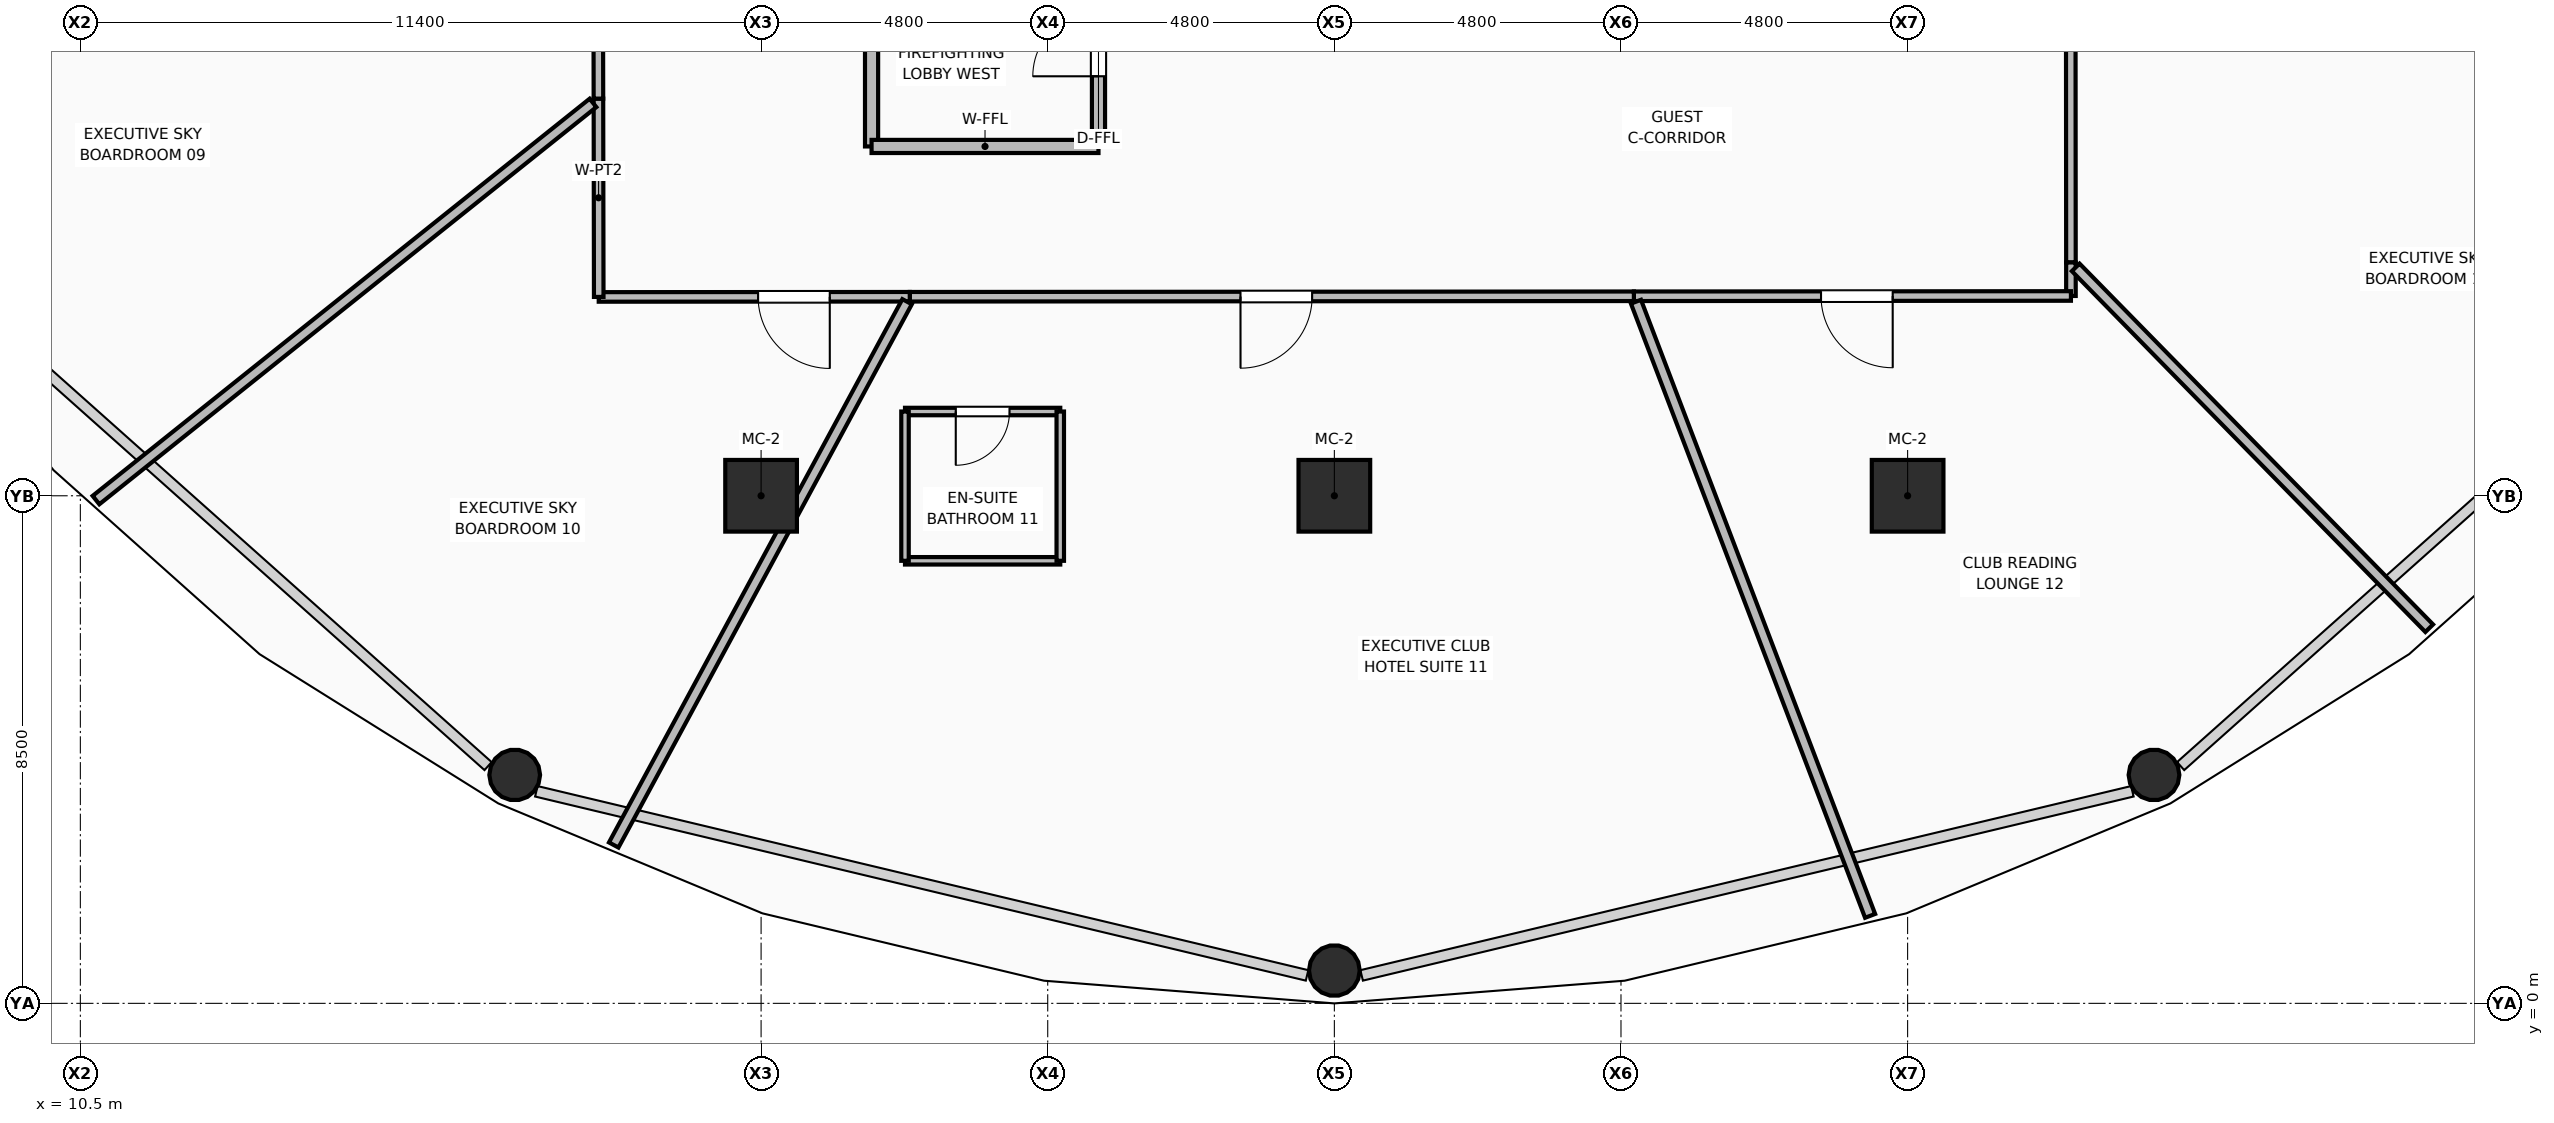
"""IFC4 building model, lengths in metres.
Left out: names, types, materials, properties, quantities, classifications, styles, units other than length and angle.
Written with IfcOpenShell. Run it as: python <this file> out.ifc"""

import sys

from ifc_helpers import new_model, si_unit, direction, frame, frame_2d, origin, origin_2d, place, context, subcontext, project, spatial, rectangle, hollow_rectangle, hollow_circle, extrude, element, fill, save


model = new_model("IFC4")
c1 = context("Model", 3, precision=1e-05, world=origin(), true_north=direction((0.0, 1.0)))
c2 = subcontext(c1, "Body", "Model", "MODEL_VIEW")
j1 = project(units=[si_unit("LENGTHUNIT", "METRE"), si_unit("PLANEANGLEUNIT", "RADIAN")], contexts=[c1])
p1 = place(None, origin())
s1 = spatial("IfcSite", under=j1, at=p1, CompositionType="ELEMENT")
p2 = place(p1, origin())
s2 = spatial("IfcBuilding", under=s1, at=p2, CompositionType="ELEMENT")
p3 = place(p2, frame((0.0, 0.0, 60.75)))
s3 = spatial("IfcBuildingStorey", under=s2, at=p3, CompositionType="ELEMENT", Elevation=60.75)
for number, where, z_axis, x_axis in (
    (1, (21.9, 8.5, 0.0), (0.0, 0.0, 1.0), (1.0, 0.0, 0.0)),
    (2, (31.5, 8.5, 0.0), (0.0, 0.0, 1.0), (1.0, 0.0, 0.0)),
    (3, (41.1, 8.5, 0.0), (0.0, 0.0, 1.0), (1.0, 0.0, 0.0)),
):
    element("IfcColumn", number, at=place(p3, frame(where, z_axis=z_axis, x_axis=x_axis)), inside=s3, PredefinedType="COLUMN", context=c2, shape_type="SweptSolid", body=[
        extrude(hollow_rectangle(XDim=1.2, YDim=1.2, WallThickness=0.045, at=origin_2d()), origin(), (0.0, 0.0, 1.0), 3.75),
    ])
for number, where, z_axis, x_axis in (
    (4, (17.774, 3.825, 0.0), (0.0, 0.0, 1.0), (1.0, 0.0, 0.0)),
    (5, (31.5, 0.549, 0.0), (0.0, 0.0, 1.0), (1.0, 0.0, 0.0)),
    (6, (45.226, 3.825, 0.0), (0.0, 0.0, 1.0), (1.0, 0.0, 0.0)),
):
    element("IfcColumn", number, at=place(p3, frame(where, z_axis=z_axis, x_axis=x_axis)), inside=s3, PredefinedType="COLUMN", context=c2, shape_type="SweptSolid", body=[
        extrude(hollow_circle(Radius=0.425, WallThickness=0.04, at=origin_2d()), origin(), (0.0, 0.0, 1.0), 3.57),
    ])
p4 = place(p3, frame((23.75, 14.35, 0.0), z_axis=(0.0, 0.0, 1.0), x_axis=(0.0, 1.0, 0.0)))
e7 = element("IfcWall", 7, at=p4, inside=s3, PredefinedType="PARTITIONING", context=c2, shape_type="SweptSolid", body=[
    extrude(rectangle(XDim=3.45, YDim=0.22, at=frame_2d((1.725, 0.0))), origin(), (0.0, 0.0, 1.0), 2.928),
])
p5 = place(p3, frame((23.75, 14.35, 0.0), z_axis=(0.0, 0.0, 1.0), x_axis=(1.0, 0.0, 0.0)))
e8 = element("IfcWall", 8, at=p5, inside=s3, PredefinedType="PARTITIONING", context=c2, shape_type="SweptSolid", body=[
    extrude(rectangle(XDim=3.8, YDim=0.22, at=frame_2d((1.9, 0.0))), origin(), (0.0, 0.0, 1.0), 3.55),
])
p6 = place(p3, frame((27.55, 14.35, 0.0), z_axis=(0.0, 0.0, 1.0), x_axis=(0.0, 1.0, 0.0)))
e9 = element("IfcWall", 9, at=p6, inside=s3, PredefinedType="PARTITIONING", context=c2, shape_type="SweptSolid", body=[
    extrude(rectangle(XDim=3.45, YDim=0.22, at=frame_2d((1.725, 0.0))), origin(), (0.0, 0.0, 1.0), 2.928),
])
p7 = place(p6, frame((1.175, 0.0, 0.0)))
e10 = element("IfcOpeningElement", 10, at=p7, cuts=e9, PredefinedType="OPENING", context=c2, shape_type="SweptSolid", body=[
    extrude(rectangle(XDim=1.1, YDim=2.1, at=frame_2d((0.55, 1.05))), frame((0.0, 0.12, 0.0), z_axis=(0.0, -1.0, 0.0), x_axis=(1.0, 0.0, 0.0)), (0.0, 0.0, 1.0), 0.24),
])
p8 = place(p3, frame((43.83, 19.568, 0.0), z_axis=(0.0, 0.0, 1.0), x_axis=(0.000681849016, -0.999999767541, 0.0)))
e11 = element("IfcWall", 11, at=p8, inside=s3, PredefinedType="PARTITIONING", context=c2, shape_type="SweptSolid", body=[
    extrude(rectangle(XDim=7.161, YDim=0.16, at=frame_2d((3.581, 0.0))), origin(), (0.0, 0.0, 1.0), 2.928),
])
p9 = place(p8, frame((0.605, 0.0, 0.0)))
e12 = element("IfcOpeningElement", 12, at=p9, cuts=e11, PredefinedType="OPENING", context=c2, shape_type="SweptSolid", body=[
    extrude(rectangle(XDim=1.2, YDim=2.1, at=frame_2d((0.6, 1.05))), frame((0.0, 0.09, 0.0), z_axis=(0.0, -1.0, 0.0), x_axis=(1.0, 0.0, 0.0)), (0.0, 0.0, 1.0), 0.18),
])
p10 = place(p3, frame((43.835, 12.407, 0.0), z_axis=(0.0, 0.0, 1.0), x_axis=(0.0, -1.0, 0.0)))
e13 = element("IfcWall", 13, at=p10, inside=s3, PredefinedType="PARTITIONING", context=c2, shape_type="SweptSolid", body=[
    extrude(rectangle(XDim=0.561, YDim=0.16, at=frame_2d((0.281, 0.0))), origin(), (0.0, 0.0, 1.0), 3.55),
])
p11 = place(p3, frame((43.835, 11.846, 0.0), z_axis=(0.0, 0.0, 1.0), x_axis=(-0.999999777452, -0.000667155766, 0.0)))
e14 = element("IfcWall", 14, at=p11, inside=s3, PredefinedType="PARTITIONING", context=c2, shape_type="SweptSolid", body=[
    extrude(rectangle(XDim=7.319, YDim=0.16, at=frame_2d((3.659, 0.0))), origin(), (0.0, 0.0, 1.0), 2.928),
])
p12 = place(p11, frame((2.985, 0.0, 0.0)))
e15 = element("IfcOpeningElement", 15, at=p12, cuts=e14, PredefinedType="OPENING", context=c2, shape_type="SweptSolid", body=[
    extrude(rectangle(XDim=1.2, YDim=2.1, at=frame_2d((0.6, 1.05))), frame((0.0, 0.09, 0.0), z_axis=(0.0, -1.0, 0.0), x_axis=(1.0, 0.0, 0.0)), (0.0, 0.0, 1.0), 0.18),
])
p13 = place(p3, frame((36.516, 11.841, 0.0), z_axis=(0.0, 0.0, 1.0), x_axis=(-0.999999779288, -0.00066439817, 0.0)))
e16 = element("IfcWall", 16, at=p13, inside=s3, PredefinedType="PARTITIONING", context=c2, shape_type="SweptSolid", body=[
    extrude(rectangle(XDim=12.126, YDim=0.16, at=frame_2d((6.063, 0.0))), origin(), (0.0, 0.0, 1.0), 2.928),
])
p14 = place(p13, frame((5.388, 0.0, 0.0)))
e17 = element("IfcOpeningElement", 17, at=p14, cuts=e16, PredefinedType="OPENING", context=c2, shape_type="SweptSolid", body=[
    extrude(rectangle(XDim=1.2, YDim=2.1, at=frame_2d((0.6, 1.05))), frame((0.0, 0.09, 0.0), z_axis=(0.0, -1.0, 0.0), x_axis=(1.0, 0.0, 0.0)), (0.0, 0.0, 1.0), 0.18),
])
p15 = place(p3, frame((24.39, 11.833, 0.0), z_axis=(0.0, 0.0, 1.0), x_axis=(-0.999999841836, -0.000562429607, 0.0)))
e18 = element("IfcWall", 18, at=p15, inside=s3, PredefinedType="PARTITIONING", context=c2, shape_type="SweptSolid", body=[
    extrude(rectangle(XDim=5.209, YDim=0.16, at=frame_2d((2.604, 0.0))), origin(), (0.0, 0.0, 1.0), 2.928),
])
p16 = place(p15, frame((1.34, 0.0, 0.0)))
e19 = element("IfcOpeningElement", 19, at=p16, cuts=e18, PredefinedType="OPENING", context=c2, shape_type="SweptSolid", body=[
    extrude(rectangle(XDim=1.2, YDim=2.1, at=frame_2d((0.6, 1.05))), frame((0.0, 0.09, 0.0), z_axis=(0.0, -1.0, 0.0), x_axis=(1.0, 0.0, 0.0)), (0.0, 0.0, 1.0), 0.18),
])
p17 = place(p3, frame((19.181, 11.83, 0.0), z_axis=(0.0, 0.0, 1.0), x_axis=(-0.001470370415, 0.999998919005, 0.0)))
e20 = element("IfcWall", 20, at=p17, inside=s3, PredefinedType="PARTITIONING", context=c2, shape_type="SweptSolid", body=[
    extrude(rectangle(XDim=3.321, YDim=0.16, at=frame_2d((1.66, 0.0))), origin(), (0.0, 0.0, 1.0), 3.55),
])
p18 = place(p3, frame((19.176, 15.151, 0.0), z_axis=(0.0, 0.0, 1.0), x_axis=(-0.001827037145, 0.999998330966, 0.0)))
e21 = element("IfcWall", 21, at=p18, inside=s3, PredefinedType="PARTITIONING", context=c2, shape_type="SweptSolid", body=[
    extrude(rectangle(XDim=6.013, YDim=0.16, at=frame_2d((3.007, 0.0))), origin(), (0.0, 0.0, 1.0), 2.928),
])
p19 = place(p18, frame((4.204, 0.0, 0.0)))
e22 = element("IfcOpeningElement", 22, at=p19, cuts=e21, PredefinedType="OPENING", context=c2, shape_type="SweptSolid", body=[
    extrude(rectangle(XDim=1.2, YDim=2.1, at=frame_2d((0.6, 1.05))), frame((0.0, 0.09, 0.0), z_axis=(0.0, -1.0, 0.0), x_axis=(1.0, 0.0, 0.0)), (0.0, 0.0, 1.0), 0.18),
])
p20 = place(p3, frame((19.085, 15.079, 0.0), z_axis=(0.0, 0.0, 1.0), x_axis=(-0.781201807071, -0.624278572938, 0.0)))
e23 = element("IfcWall", 23, at=p20, inside=s3, PredefinedType="PARTITIONING", context=c2, shape_type="SweptSolid", body=[
    extrude(rectangle(XDim=10.654, YDim=0.18, at=frame_2d((5.327, 0.0))), origin(), (0.0, 0.0, 1.0), 2.775),
])
p21 = place(p3, frame((24.345, 11.75, 0.0), z_axis=(0.0, 0.0, 1.0), x_axis=(-0.475165367646, -0.879896512887, 0.0)))
e24 = element("IfcWall", 24, at=p21, inside=s3, PredefinedType="PARTITIONING", context=c2, shape_type="SweptSolid", body=[
    extrude(rectangle(XDim=10.34, YDim=0.18, at=frame_2d((5.17, 0.0))), origin(), (0.0, 0.0, 1.0), 2.775),
])
p22 = place(p3, frame((36.551, 11.75, 0.0), z_axis=(0.0, 0.0, 1.0), x_axis=(0.356220373455, -0.934401972138, 0.0)))
e25 = element("IfcWall", 25, at=p22, inside=s3, PredefinedType="PARTITIONING", context=c2, shape_type="SweptSolid", body=[
    extrude(rectangle(XDim=11.007, YDim=0.18, at=frame_2d((5.503, 0.0))), origin(), (0.0, 0.0, 1.0), 2.775),
])
p23 = place(p3, frame((43.915, 12.325, 0.0), z_axis=(0.0, 0.0, 1.0), x_axis=(0.699796666029, -0.714342093268, 0.0)))
e26 = element("IfcWall", 26, at=p23, inside=s3, PredefinedType="PARTITIONING", context=c2, shape_type="SweptSolid", body=[
    extrude(rectangle(XDim=8.459, YDim=0.18, at=frame_2d((4.23, 0.0))), origin(), (0.0, 0.0, 1.0), 2.775),
])
p24 = place(p3, frame((43.915, 19.531, 0.0), z_axis=(0.0, 0.0, 1.0), x_axis=(0.915142788341, -0.403129851223, 0.0)))
e27 = element("IfcWall", 27, at=p24, inside=s3, PredefinedType="PARTITIONING", context=c2, shape_type="SweptSolid", body=[
    extrude(rectangle(XDim=13.675, YDim=0.18, at=frame_2d((6.838, 0.0))), origin(), (0.0, 0.0, 1.0), 2.775),
])
p25 = place(p3, frame((24.31, 7.411, 0.0), z_axis=(0.0, 0.0, 1.0), x_axis=(1.0, 0.0, 0.0)))
e28 = element("IfcWall", 28, at=p25, inside=s3, PredefinedType="PARTITIONING", context=c2, shape_type="SweptSolid", body=[
    extrude(rectangle(XDim=2.6, YDim=0.125, at=frame_2d((1.3, 0.0))), origin(), (0.0, 0.0, 1.0), 3.55),
])
p26 = place(p3, frame((24.31, 9.911, 0.0), z_axis=(0.0, 0.0, 1.0), x_axis=(1.0, 0.0, 0.0)))
e29 = element("IfcWall", 29, at=p26, inside=s3, PredefinedType="PARTITIONING", context=c2, shape_type="SweptSolid", body=[
    extrude(rectangle(XDim=2.6, YDim=0.125, at=frame_2d((1.3, 0.0))), origin(), (0.0, 0.0, 1.0), 3.55),
])
p27 = place(p26, frame((0.85, 0.0, 0.0)))
e30 = element("IfcOpeningElement", 30, at=p27, cuts=e29, PredefinedType="OPENING", context=c2, shape_type="SweptSolid", body=[
    extrude(rectangle(XDim=0.9, YDim=2.1, at=frame_2d((0.45, 1.05))), frame((0.0, 0.073, 0.0), z_axis=(0.0, -1.0, 0.0), x_axis=(1.0, 0.0, 0.0)), (0.0, 0.0, 1.0), 0.145),
])
for number, where, z_axis, x_axis in (
    (31, (24.31, 7.411, 0.0), (0.0, 0.0, 1.0), (0.0, 1.0, 0.0)),
    (32, (26.91, 7.411, 0.0), (0.0, 0.0, 1.0), (0.0, 1.0, 0.0)),
):
    element("IfcWall", number, at=place(p3, frame(where, z_axis=z_axis, x_axis=x_axis)), inside=s3, PredefinedType="PARTITIONING", context=c2, shape_type="SweptSolid", body=[
        extrude(rectangle(XDim=2.5, YDim=0.125, at=frame_2d((1.25, 0.0))), origin(), (0.0, 0.0, 1.0), 3.55),
    ])
p28 = place(p7, origin())
e33 = element("IfcDoor", 33, at=p28, inside=s3, OperationType="SINGLE_SWING_LEFT", PredefinedType="DOOR", context=c2, shape_type="SweptSolid", body=[
    extrude(rectangle(XDim=1.1, YDim=2.1, at=frame_2d((0.55, 1.05))), frame((0.0, 0.025, 0.0), z_axis=(0.0, -1.0, 0.0), x_axis=(1.0, 0.0, 0.0)), (0.0, 0.0, 1.0), 0.05),
])
fill(e10, e33)
p29 = place(p16, origin())
e34 = element("IfcDoor", 34, at=p29, inside=s3, OperationType="SINGLE_SWING_LEFT", PredefinedType="DOOR", context=c2, shape_type="SweptSolid", body=[
    extrude(rectangle(XDim=1.2, YDim=2.1, at=frame_2d((0.6, 1.05))), frame((0.0, 0.025, 0.0), z_axis=(0.0, -1.0, 0.0), x_axis=(1.0, 0.0, 0.0)), (0.0, 0.0, 1.0), 0.05),
])
fill(e19, e34)
p30 = place(p27, frame((0.9, 0.0, 0.0), z_axis=(0.0, 0.0, 1.0), x_axis=(-1.0, 0.0, 0.0)))
e35 = element("IfcDoor", 35, at=p30, inside=s3, OperationType="SINGLE_SWING_RIGHT", PredefinedType="DOOR", context=c2, shape_type="SweptSolid", body=[
    extrude(rectangle(XDim=0.9, YDim=2.1, at=frame_2d((0.45, 1.05))), frame((0.0, 0.025, 0.0), z_axis=(0.0, -1.0, 0.0), x_axis=(1.0, 0.0, 0.0)), (0.0, 0.0, 1.0), 0.05),
])
fill(e30, e35)
p31 = place(p14, origin())
e36 = element("IfcDoor", 36, at=p31, inside=s3, OperationType="SINGLE_SWING_RIGHT", PredefinedType="DOOR", context=c2, shape_type="SweptSolid", body=[
    extrude(rectangle(XDim=1.2, YDim=2.1, at=frame_2d((0.6, 1.05))), frame((0.0, 0.025, 0.0), z_axis=(0.0, -1.0, 0.0), x_axis=(1.0, 0.0, 0.0)), (0.0, 0.0, 1.0), 0.05),
])
fill(e17, e36)
p32 = place(p12, origin())
e37 = element("IfcDoor", 37, at=p32, inside=s3, OperationType="SINGLE_SWING_LEFT", PredefinedType="DOOR", context=c2, shape_type="SweptSolid", body=[
    extrude(rectangle(XDim=1.2, YDim=2.1, at=frame_2d((0.6, 1.05))), frame((0.0, 0.025, 0.0), z_axis=(0.0, -1.0, 0.0), x_axis=(1.0, 0.0, 0.0)), (0.0, 0.0, 1.0), 0.05),
])
fill(e15, e37)
save(model, sys.argv[1])
